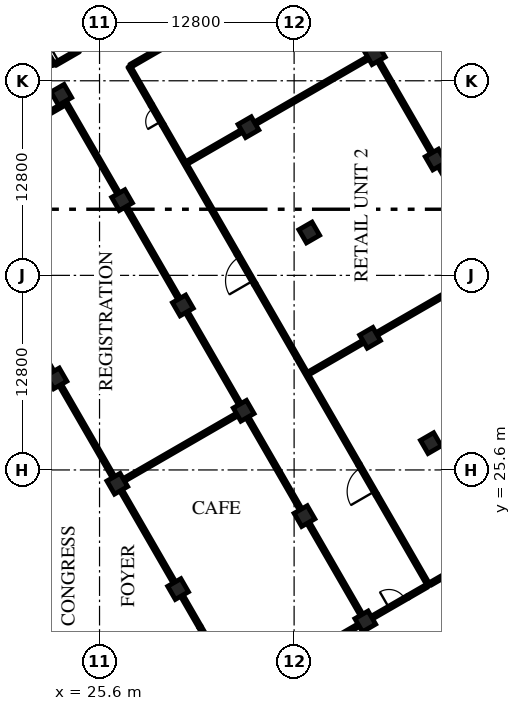
"""IFC4 building model, lengths in metres.
Left out: names, types, materials, properties, quantities, classifications, styles, units other than length and angle.
Written with IfcOpenShell. Run it as: python <this file> out.ifc"""

import sys

from ifc_helpers import new_model, si_unit, direction, frame, frame_2d, origin, origin_2d, place, context, subcontext, project, spatial, rectangle, extrude, element, fill, save


model = new_model("IFC4")
c1 = context("Model", 3, precision=1e-05, world=origin(), true_north=direction((0.0, 1.0)))
c2 = subcontext(c1, "Body", "Model", "MODEL_VIEW")
j1 = project(units=[si_unit("LENGTHUNIT", "METRE"), si_unit("PLANEANGLEUNIT", "RADIAN")], contexts=[c1])
p1 = place(None, origin())
s1 = spatial("IfcSite", under=j1, at=p1, CompositionType="ELEMENT")
p2 = place(p1, origin())
s2 = spatial("IfcBuilding", under=s1, at=p2, CompositionType="ELEMENT")
p3 = place(p2, origin())
s3 = spatial("IfcBuildingStorey", under=s2, at=p3, CompositionType="ELEMENT", Elevation=0.0)
for number, where, z_axis, x_axis in (
    (1, (43.082, 15.636, -0.3), (0.0, 0.0, 1.0), (-0.5, 0.866, 0.0)),
    (2, (30.768, 17.764, -0.3), (0.0, 0.0, 1.0), (-0.5, 0.866, 0.0)),
    (3, (39.082, 22.564, -0.3), (0.0, 0.0, 1.0), (-0.5, 0.866, 0.0)),
    (4, (47.396, 27.364, -0.3), (0.0, 0.0, 1.0), (-0.5, 0.866, 0.0)),
    (5, (26.768, 24.692, -0.3), (0.0, 0.0, 1.0), (-0.5, 0.866, 0.0)),
    (6, (35.082, 29.492, -0.3), (0.0, 0.0, 1.0), (-0.5, 0.866, 0.0)),
    (7, (43.396, 34.292, -0.3), (0.0, 0.0, 1.0), (-0.5, 0.866, 0.0)),
    (8, (22.768, 31.62, -0.3), (0.0, 0.0, 1.0), (-0.5, 0.866, 0.0)),
    (9, (31.082, 36.42, -0.3), (0.0, 0.0, 1.0), (-0.5, 0.866, 0.0)),
    (10, (39.396, 41.22, -0.3), (0.0, 0.0, 1.0), (-0.5, 0.866, 0.0)),
    (11, (47.71, 46.021, -0.3), (0.0, 0.0, 1.0), (-0.5, 0.866, 0.0)),
    (12, (27.082, 43.349, -0.3), (0.0, 0.0, 1.0), (-0.5, 0.866, 0.0)),
    (13, (35.396, 48.149, -0.3), (0.0, 0.0, 1.0), (-0.5, 0.866, 0.0)),
    (14, (43.71, 52.948, -0.3), (0.0, 0.0, 1.0), (-0.5, 0.866, 0.0)),
    (15, (23.082, 50.277, -0.3), (0.0, 0.0, 1.0), (-0.5, 0.866, 0.0)),
):
    element("IfcColumn", number, at=place(p3, frame(where, z_axis=z_axis, x_axis=x_axis)), inside=s3, PredefinedType="COLUMN", context=c2, shape_type="SweptSolid", body=[
        extrude(rectangle(XDim=1.0, YDim=1.0, at=origin_2d()), origin(), (0.0, 0.0, 1.0), 6.3),
    ])
p4 = place(p3, frame((47.49, 65.351, 0.0), z_axis=(0.0, 0.0, 1.0), x_axis=(0.499999548647, -0.866025664373, 0.0)))
e16 = element("IfcWall", 16, at=p4, inside=s3, PredefinedType="SOLIDWALL", context=c2, shape_type="SweptSolid", body=[
    extrude(rectangle(XDim=34.6, YDim=0.25, at=frame_2d((17.3, 0.0))), origin(), (0.0, 0.0, 1.0), 5.7),
])
p5 = place(p3, frame((22.583, 52.24, 0.0), z_axis=(0.0, 0.0, 1.0), x_axis=(-0.499892348375, 0.866087547558, 0.0)))
e17 = element("IfcWall", 17, at=p5, inside=s3, PredefinedType="PARTITIONING", context=c2, shape_type="SweptSolid", body=[
    extrude(rectangle(XDim=1.7, YDim=0.2, at=frame_2d((0.85, 0.0))), origin(), (0.0, 0.0, 1.0), 5.1),
])
p6 = place(p3, frame((22.67, 52.291, 0.0), z_axis=(0.0, 0.0, 1.0), x_axis=(0.865989075817, 0.500062916607, 0.0)))
e18 = element("IfcWall", 18, at=p6, inside=s3, PredefinedType="PARTITIONING", context=c2, shape_type="SweptSolid", body=[
    extrude(rectangle(XDim=1.8, YDim=0.2, at=frame_2d((0.9, 0.0))), origin(), (0.0, 0.0, 1.0), 5.1),
])
p7 = place(p6, frame((0.3, 0.0, 0.0)))
e19 = element("IfcOpeningElement", 19, at=p7, cuts=e18, PredefinedType="OPENING", context=c2, shape_type="SweptSolid", body=[
    extrude(rectangle(XDim=1.2, YDim=2.1, at=frame_2d((0.6, 1.05))), frame((0.0, 0.11, 0.0), z_axis=(0.0, -1.0, 0.0), x_axis=(1.0, 0.0, 0.0)), (0.0, 0.0, 1.0), 0.22),
])
p8 = place(p3, frame((33.343, 13.304, 0.0), z_axis=(0.0, 0.0, 1.0), x_axis=(-0.499952165731, 0.866053019151, 0.0)))
e20 = element("IfcWall", 20, at=p8, inside=s3, PredefinedType="PARTITIONING", context=c2, shape_type="SweptSolid", body=[
    extrude(rectangle(XDim=2.3, YDim=0.2, at=frame_2d((1.15, 0.0))), origin(), (0.0, 0.0, 1.0), 5.1),
])
p9 = place(p8, frame((0.25, 0.0, 0.0)))
e21 = element("IfcOpeningElement", 21, at=p9, cuts=e20, PredefinedType="OPENING", context=c2, shape_type="SweptSolid", body=[
    extrude(rectangle(XDim=1.8, YDim=2.1, at=frame_2d((0.9, 1.05))), frame((0.0, 0.11, 0.0), z_axis=(0.0, -1.0, 0.0), x_axis=(1.0, 0.0, 0.0)), (0.0, 0.0, 1.0), 0.22),
])
p10 = place(p3, frame((32.193, 15.296, 0.0), z_axis=(0.0, 0.0, 1.0), x_axis=(-0.500016218704, 0.866016039709, 0.0)))
e22 = element("IfcWall", 22, at=p10, inside=s3, PredefinedType="PARTITIONING", context=c2, shape_type="SweptSolid", body=[
    extrude(rectangle(XDim=2.35, YDim=0.2, at=frame_2d((1.175, 0.0))), origin(), (0.0, 0.0, 1.0), 5.1),
])
for number, where, z_axis, x_axis in (
    (23, (30.518, 18.197, 0.0), (0.0, 0.0, 1.0), (-0.5, 0.866, 0.0)),
    (24, (26.518, 25.125, 0.0), (0.0, 0.0, 1.0), (-0.5, 0.866, 0.0)),
):
    element("IfcWall", number, at=place(p3, frame(where, z_axis=z_axis, x_axis=x_axis)), inside=s3, PredefinedType="PARTITIONING", context=c2, shape_type="SweptSolid", body=[
        extrude(rectangle(XDim=7.0, YDim=0.2, at=frame_2d((3.5, 0.0))), origin(), (0.0, 0.0, 1.0), 5.1),
    ])
p11 = place(p3, frame((22.518, 32.053, 0.0), z_axis=(0.0, 0.0, 1.0), x_axis=(-0.500016218704, 0.866016039709, 0.0)))
e25 = element("IfcWall", 25, at=p11, inside=s3, PredefinedType="PARTITIONING", context=c2, shape_type="SweptSolid", body=[
    extrude(rectangle(XDim=2.35, YDim=0.2, at=frame_2d((1.175, 0.0))), origin(), (0.0, 0.0, 1.0), 5.1),
])
p12 = place(p3, frame((42.832, 16.069, 0.0), z_axis=(0.0, 0.0, 1.0), x_axis=(-0.499995173006, 0.866028190633, 0.0)))
e26 = element("IfcWall", 26, at=p12, inside=s3, PredefinedType="PARTITIONING", context=c2, shape_type="SweptSolid", body=[
    extrude(rectangle(XDim=7.0, YDim=0.2, at=frame_2d((3.5, 0.0))), origin(), (0.0, 0.0, 1.0), 5.1),
])
for number, where, z_axis, x_axis in (
    (27, (38.832, 22.997, 0.0), (0.0, 0.0, 1.0), (-0.5, 0.866, 0.0)),
    (28, (34.832, 29.925, 0.0), (0.0, 0.0, 1.0), (-0.5, 0.866, 0.0)),
    (29, (30.832, 36.854, 0.0), (0.0, 0.0, 1.0), (-0.5, 0.866, 0.0)),
):
    element("IfcWall", number, at=place(p3, frame(where, z_axis=z_axis, x_axis=x_axis)), inside=s3, PredefinedType="PARTITIONING", context=c2, shape_type="SweptSolid", body=[
        extrude(rectangle(XDim=7.0, YDim=0.2, at=frame_2d((3.5, 0.0))), origin(), (0.0, 0.0, 1.0), 5.1),
    ])
p13 = place(p3, frame((26.832, 43.781, 0.0), z_axis=(0.0, 0.0, 1.0), x_axis=(-0.499988857673, 0.866031836714, 0.0)))
e30 = element("IfcWall", 30, at=p13, inside=s3, PredefinedType="PARTITIONING", context=c2, shape_type="SweptSolid", body=[
    extrude(rectangle(XDim=6.875, YDim=0.2, at=frame_2d((3.438, 0.0))), origin(), (0.0, 0.0, 1.0), 5.1),
])
p14 = place(p3, frame((47.239, 18.036, 0.0), z_axis=(0.0, 0.0, 1.0), x_axis=(-0.500014519185, 0.866017020967, 0.0)))
e31 = element("IfcWall", 31, at=p14, inside=s3, PredefinedType="PARTITIONING", context=c2, shape_type="SweptSolid", body=[
    extrude(rectangle(XDim=6.85, YDim=0.2, at=frame_2d((3.425, 0.0))), origin(), (0.0, 0.0, 1.0), 5.1),
])
p15 = place(p3, frame((43.814, 23.968, 0.0), z_axis=(0.0, 0.0, 1.0), x_axis=(-0.500031774688, 0.866007057882, 0.0)))
e32 = element("IfcWall", 32, at=p15, inside=s3, PredefinedType="PARTITIONING", context=c2, shape_type="SweptSolid", body=[
    extrude(rectangle(XDim=2.3, YDim=0.2, at=frame_2d((1.15, 0.0))), origin(), (0.0, 0.0, 1.0), 5.1),
])
p16 = place(p15, frame((0.25, 0.0, 0.0)))
e33 = element("IfcOpeningElement", 33, at=p16, cuts=e32, PredefinedType="OPENING", context=c2, shape_type="SweptSolid", body=[
    extrude(rectangle(XDim=1.8, YDim=2.1, at=frame_2d((0.9, 1.05))), frame((0.0, 0.11, 0.0), z_axis=(0.0, -1.0, 0.0), x_axis=(1.0, 0.0, 0.0)), (0.0, 0.0, 1.0), 0.22),
])
p17 = place(p3, frame((42.664, 25.96, 0.0), z_axis=(0.0, 0.0, 1.0), x_axis=(-0.499993437113, 0.866029192836, 0.0)))
e34 = element("IfcWall", 34, at=p17, inside=s3, PredefinedType="PARTITIONING", context=c2, shape_type="SweptSolid", body=[
    extrude(rectangle(XDim=13.7, YDim=0.2, at=frame_2d((6.85, 0.0))), origin(), (0.0, 0.0, 1.0), 5.1),
])
p18 = place(p3, frame((35.814, 37.824, 0.0), z_axis=(0.0, 0.0, 1.0), x_axis=(-0.500031774688, 0.866007057882, 0.0)))
e35 = element("IfcWall", 35, at=p18, inside=s3, PredefinedType="PARTITIONING", context=c2, shape_type="SweptSolid", body=[
    extrude(rectangle(XDim=2.3, YDim=0.2, at=frame_2d((1.15, 0.0))), origin(), (0.0, 0.0, 1.0), 5.1),
])
p19 = place(p18, frame((0.25, 0.0, 0.0)))
e36 = element("IfcOpeningElement", 36, at=p19, cuts=e35, PredefinedType="OPENING", context=c2, shape_type="SweptSolid", body=[
    extrude(rectangle(XDim=1.8, YDim=2.1, at=frame_2d((0.9, 1.05))), frame((0.0, 0.11, 0.0), z_axis=(0.0, -1.0, 0.0), x_axis=(1.0, 0.0, 0.0)), (0.0, 0.0, 1.0), 0.22),
])
p20 = place(p3, frame((34.664, 39.816, 0.0), z_axis=(0.0, 0.0, 1.0), x_axis=(-0.49999201416, 0.866030014362, 0.0)))
e37 = element("IfcWall", 37, at=p20, inside=s3, PredefinedType="PARTITIONING", context=c2, shape_type="SweptSolid", body=[
    extrude(rectangle(XDim=9.8, YDim=0.2, at=frame_2d((4.9, 0.0))), origin(), (0.0, 0.0, 1.0), 5.1),
])
p21 = place(p3, frame((29.764, 48.303, 0.0), z_axis=(0.0, 0.0, 1.0), x_axis=(-0.500060622324, 0.86599040064, 0.0)))
e38 = element("IfcWall", 38, at=p21, inside=s3, PredefinedType="PARTITIONING", context=c2, shape_type="SweptSolid", body=[
    extrude(rectangle(XDim=1.5, YDim=0.2, at=frame_2d((0.75, 0.0))), origin(), (0.0, 0.0, 1.0), 5.1),
])
p22 = place(p21, frame((0.25, 0.0, 0.0)))
e39 = element("IfcOpeningElement", 39, at=p22, cuts=e38, PredefinedType="OPENING", context=c2, shape_type="SweptSolid", body=[
    extrude(rectangle(XDim=1.0, YDim=2.1, at=frame_2d((0.5, 1.05))), frame((0.0, 0.11, 0.0), z_axis=(0.0, -1.0, 0.0), x_axis=(1.0, 0.0, 0.0)), (0.0, 0.0, 1.0), 0.22),
])
p23 = place(p3, frame((29.014, 49.602, 0.0), z_axis=(0.0, 0.0, 1.0), x_axis=(-0.499963291492, 0.866046596414, 0.0)))
e40 = element("IfcWall", 40, at=p23, inside=s3, PredefinedType="PARTITIONING", context=c2, shape_type="SweptSolid", body=[
    extrude(rectangle(XDim=2.925, YDim=0.2, at=frame_2d((1.462, 0.0))), origin(), (0.0, 0.0, 1.0), 5.1),
])
for number, where, z_axis, x_axis in (
    (41, (51.46, 39.525, 0.0), (0.0, 0.0, 1.0), (-0.5, 0.866, 0.0)),
    (42, (47.46, 46.453, 0.0), (0.0, 0.0, 1.0), (-0.5, 0.866, 0.0)),
):
    element("IfcWall", number, at=place(p3, frame(where, z_axis=z_axis, x_axis=x_axis)), inside=s3, PredefinedType="PARTITIONING", context=c2, shape_type="SweptSolid", body=[
        extrude(rectangle(XDim=7.0, YDim=0.2, at=frame_2d((3.5, 0.0))), origin(), (0.0, 0.0, 1.0), 5.1),
    ])
p24 = place(p3, frame((35.201, 11.086, 0.0), z_axis=(0.0, 0.0, 1.0), x_axis=(0.866021068297, 0.500007509209, 0.0)))
e43 = element("IfcWall", 43, at=p24, inside=s3, PredefinedType="PARTITIONING", context=c2, shape_type="SweptSolid", body=[
    extrude(rectangle(XDim=8.6, YDim=0.2, at=frame_2d((4.3, 0.0))), origin(), (0.0, 0.0, 1.0), 5.1),
])
p25 = place(p3, frame((43.515, 15.886, 0.0), z_axis=(0.0, 0.0, 1.0), x_axis=(0.866027397988, 0.499996545922, 0.0)))
e44 = element("IfcWall", 44, at=p25, inside=s3, PredefinedType="PARTITIONING", context=c2, shape_type="SweptSolid", body=[
    extrude(rectangle(XDim=2.75, YDim=0.2, at=frame_2d((1.375, 0.0))), origin(), (0.0, 0.0, 1.0), 5.1),
])
p26 = place(p25, frame((1.3, 0.0, 0.0)))
e45 = element("IfcOpeningElement", 45, at=p26, cuts=e44, PredefinedType="OPENING", context=c2, shape_type="SweptSolid", body=[
    extrude(rectangle(XDim=1.2, YDim=2.1, at=frame_2d((0.6, 1.05))), frame((0.0, 0.11, 0.0), z_axis=(0.0, -1.0, 0.0), x_axis=(1.0, 0.0, 0.0)), (0.0, 0.0, 1.0), 0.22),
])
p27 = place(p3, frame((45.896, 17.261, 0.0), z_axis=(0.0, 0.0, 1.0), x_axis=(0.866017369001, 0.500013916395, 0.0)))
e46 = element("IfcWall", 46, at=p27, inside=s3, PredefinedType="PARTITIONING", context=c2, shape_type="SweptSolid", body=[
    extrude(rectangle(XDim=1.45, YDim=0.2, at=frame_2d((0.725, 0.0))), origin(), (0.0, 0.0, 1.0), 5.1),
])
p28 = place(p3, frame((47.325, 18.086, 0.0), z_axis=(0.0, 0.0, 1.0), x_axis=(0.866023935413, 0.500002543286, 0.0)))
e47 = element("IfcWall", 47, at=p28, inside=s3, PredefinedType="PARTITIONING", context=c2, shape_type="SweptSolid", body=[
    extrude(rectangle(XDim=4.2, YDim=0.2, at=frame_2d((2.1, 0.0))), origin(), (0.0, 0.0, 1.0), 5.1),
])
p29 = place(p3, frame((27.201, 24.942, 0.0), z_axis=(0.0, 0.0, 1.0), x_axis=(0.866021068297, 0.500007509209, 0.0)))
e48 = element("IfcWall", 48, at=p29, inside=s3, PredefinedType="PARTITIONING", context=c2, shape_type="SweptSolid", body=[
    extrude(rectangle(XDim=8.6, YDim=0.2, at=frame_2d((4.3, 0.0))), origin(), (0.0, 0.0, 1.0), 5.1),
])
p30 = place(p3, frame((39.325, 31.942, 0.0), z_axis=(0.0, 0.0, 1.0), x_axis=(0.866023935413, 0.500002543286, 0.0)))
e49 = element("IfcWall", 49, at=p30, inside=s3, PredefinedType="PARTITIONING", context=c2, shape_type="SweptSolid", body=[
    extrude(rectangle(XDim=4.2, YDim=0.2, at=frame_2d((2.1, 0.0))), origin(), (0.0, 0.0, 1.0), 5.1),
])
p31 = place(p3, frame((43.829, 34.542, 0.0), z_axis=(0.0, 0.0, 1.0), x_axis=(0.866021068297, 0.500007509209, 0.0)))
e50 = element("IfcWall", 50, at=p31, inside=s3, PredefinedType="PARTITIONING", context=c2, shape_type="SweptSolid", body=[
    extrude(rectangle(XDim=8.6, YDim=0.2, at=frame_2d((4.3, 0.0))), origin(), (0.0, 0.0, 1.0), 5.1),
])
p32 = place(p3, frame((31.325, 45.799, 0.0), z_axis=(0.0, 0.0, 1.0), x_axis=(0.866023935413, 0.500002543286, 0.0)))
e51 = element("IfcWall", 51, at=p32, inside=s3, PredefinedType="PARTITIONING", context=c2, shape_type="SweptSolid", body=[
    extrude(rectangle(XDim=4.2, YDim=0.2, at=frame_2d((2.1, 0.0))), origin(), (0.0, 0.0, 1.0), 5.1),
])
p33 = place(p3, frame((35.829, 48.399, 0.0), z_axis=(0.0, 0.0, 1.0), x_axis=(0.866033360935, 0.499986217557, 0.0)))
e52 = element("IfcWall", 52, at=p33, inside=s3, PredefinedType="PARTITIONING", context=c2, shape_type="SweptSolid", body=[
    extrude(rectangle(XDim=8.6, YDim=0.2, at=frame_2d((4.3, 0.0))), origin(), (0.0, 0.0, 1.0), 5.1),
])
p34 = place(p3, frame((15.167, 44.986, 0.0), z_axis=(0.0, 0.0, 1.0), x_axis=(0.866027286158, 0.499996739618, 0.0)))
e53 = element("IfcWall", 53, at=p34, inside=s3, PredefinedType="PARTITIONING", context=c2, shape_type="SweptSolid", body=[
    extrude(rectangle(XDim=9.4, YDim=0.2, at=frame_2d((4.7, 0.0))), origin(), (0.0, 0.0, 1.0), 5.1),
])
p35 = place(p3, frame((27.638, 52.186, 0.0), z_axis=(0.0, 0.0, 1.0), x_axis=(0.866023247849, 0.500003734171, 0.0)))
e54 = element("IfcWall", 54, at=p35, inside=s3, PredefinedType="PARTITIONING", context=c2, shape_type="SweptSolid", body=[
    extrude(rectangle(XDim=14.2, YDim=0.2, at=frame_2d((7.1, 0.0))), origin(), (0.0, 0.0, 1.0), 5.1),
])
p36 = place(p7, origin())
e55 = element("IfcDoor", 55, at=p36, inside=s3, OperationType="SINGLE_SWING_LEFT", PredefinedType="DOOR", context=c2, shape_type="SweptSolid", body=[
    extrude(rectangle(XDim=1.2, YDim=2.1, at=frame_2d((0.6, 1.05))), frame((0.0, 0.025, 0.0), z_axis=(0.0, -1.0, 0.0), x_axis=(1.0, 0.0, 0.0)), (0.0, 0.0, 1.0), 0.05),
])
fill(e19, e55)
p37 = place(p9, origin())
e56 = element("IfcDoor", 56, at=p37, inside=s3, OperationType="DOUBLE_DOOR_SINGLE_SWING", PredefinedType="DOOR", context=c2, shape_type="SweptSolid", body=[
    extrude(rectangle(XDim=1.8, YDim=2.1, at=frame_2d((0.9, 1.05))), frame((0.0, 0.025, 0.0), z_axis=(0.0, -1.0, 0.0), x_axis=(1.0, 0.0, 0.0)), (0.0, 0.0, 1.0), 0.05),
])
fill(e21, e56)
p38 = place(p16, origin())
e57 = element("IfcDoor", 57, at=p38, inside=s3, OperationType="DOUBLE_DOOR_SINGLE_SWING", PredefinedType="DOOR", context=c2, shape_type="SweptSolid", body=[
    extrude(rectangle(XDim=1.8, YDim=2.1, at=frame_2d((0.9, 1.05))), frame((0.0, 0.025, 0.0), z_axis=(0.0, -1.0, 0.0), x_axis=(1.0, 0.0, 0.0)), (0.0, 0.0, 1.0), 0.05),
])
fill(e33, e57)
p39 = place(p19, origin())
e58 = element("IfcDoor", 58, at=p39, inside=s3, OperationType="DOUBLE_DOOR_SINGLE_SWING", PredefinedType="DOOR", context=c2, shape_type="SweptSolid", body=[
    extrude(rectangle(XDim=1.8, YDim=2.1, at=frame_2d((0.9, 1.05))), frame((0.0, 0.025, 0.0), z_axis=(0.0, -1.0, 0.0), x_axis=(1.0, 0.0, 0.0)), (0.0, 0.0, 1.0), 0.05),
])
fill(e36, e58)
p40 = place(p22, origin())
e59 = element("IfcDoor", 59, at=p40, inside=s3, OperationType="SINGLE_SWING_LEFT", PredefinedType="DOOR", context=c2, shape_type="SweptSolid", body=[
    extrude(rectangle(XDim=1.0, YDim=2.1, at=frame_2d((0.5, 1.05))), frame((0.0, 0.025, 0.0), z_axis=(0.0, -1.0, 0.0), x_axis=(1.0, 0.0, 0.0)), (0.0, 0.0, 1.0), 0.05),
])
fill(e39, e59)
p41 = place(p26, origin())
e60 = element("IfcDoor", 60, at=p41, inside=s3, OperationType="SINGLE_SWING_LEFT", PredefinedType="DOOR", context=c2, shape_type="SweptSolid", body=[
    extrude(rectangle(XDim=1.2, YDim=2.1, at=frame_2d((0.6, 1.05))), frame((0.0, 0.025, 0.0), z_axis=(0.0, -1.0, 0.0), x_axis=(1.0, 0.0, 0.0)), (0.0, 0.0, 1.0), 0.05),
])
fill(e45, e60)
save(model, sys.argv[1])
